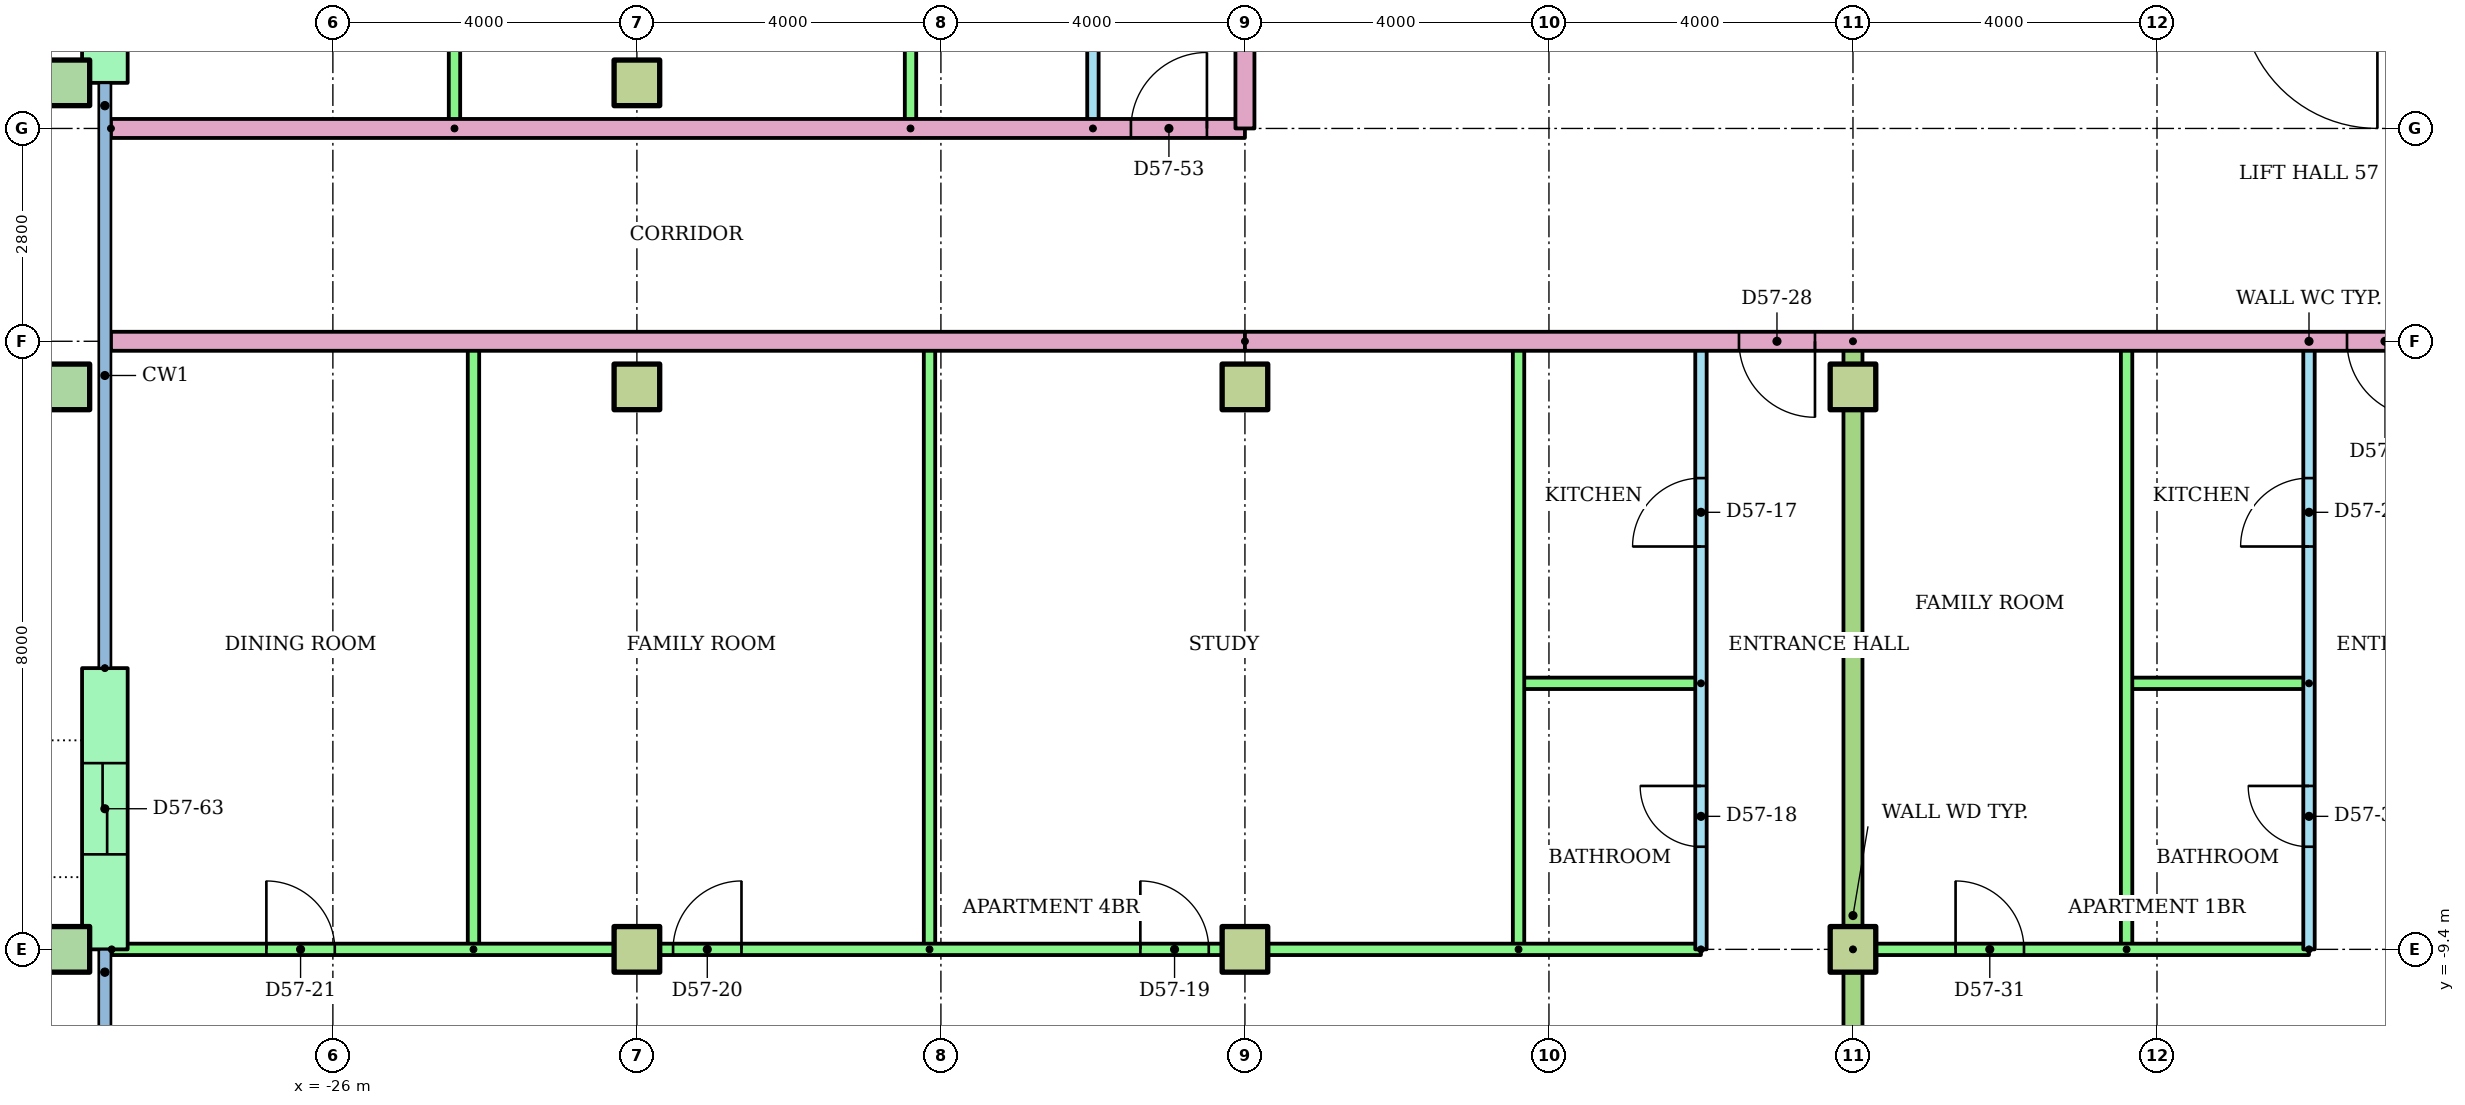
"""IFC4 building model, lengths in metres.
Left out: names, types, materials, properties, quantities, classifications, styles, units other than length and angle.
Written with IfcOpenShell. Run it as: python <this file> out.ifc"""

import sys

from ifc_helpers import new_model, si_unit, direction, frame, frame_2d, origin, origin_2d, place, context, subcontext, project, spatial, rectangle, hollow_rectangle, extrude, element, fill, save


model = new_model("IFC4")
c1 = context("Model", 3, precision=1e-05, world=origin(), true_north=direction((0.0, 1.0)))
c2 = subcontext(c1, "Body", "Model", "MODEL_VIEW")
j1 = project(units=[si_unit("LENGTHUNIT", "METRE"), si_unit("PLANEANGLEUNIT", "RADIAN")], contexts=[c1])
p1 = place(None, origin())
s1 = spatial("IfcSite", under=j1, at=p1, CompositionType="ELEMENT")
p2 = place(p1, origin())
s2 = spatial("IfcBuilding", under=s1, at=p2, CompositionType="ELEMENT")
p3 = place(p2, frame((0.0, 0.0, 220.4)))
s3 = spatial("IfcBuildingStorey", under=s2, at=p3, CompositionType="ELEMENT", Elevation=220.4)
p4 = place(p3, frame((-29.5, -9.4, 0.0)))
e1 = element("IfcColumn", 1, at=p4, inside=s3, PredefinedType="COLUMN", context=c2, shape_type="SweptSolid", body=[
    extrude(hollow_rectangle(XDim=0.6, YDim=0.6, WallThickness=0.03, at=origin_2d()), origin(), (0.0, 0.0, 1.0), 3.2),
])
for number, where in (
    (2, (-22.0, -9.4, 0.0)),
    (3, (-14.0, -9.4, 0.0)),
    (4, (-6.0, -9.4, 0.0)),
):
    element("IfcColumn", number, at=place(p3, frame(where)), inside=s3, PredefinedType="COLUMN", context=c2, shape_type="SweptSolid", body=[
        extrude(rectangle(XDim=0.6, YDim=0.6, at=origin_2d()), origin(), (0.0, 0.0, 1.0), 3.2),
    ])
p5 = place(p3, frame((-29.5, -2.0, 0.0)))
e5 = element("IfcColumn", 5, at=p5, inside=s3, PredefinedType="COLUMN", context=c2, shape_type="SweptSolid", body=[
    extrude(hollow_rectangle(XDim=0.6, YDim=0.6, WallThickness=0.03, at=origin_2d()), origin(), (0.0, 0.0, 1.0), 3.2),
])
for number, where in (
    (6, (-22.0, -2.0, 0.0)),
    (7, (-14.0, -2.0, 0.0)),
    (8, (-6.0, -2.0, 0.0)),
):
    element("IfcColumn", number, at=place(p3, frame(where)), inside=s3, PredefinedType="COLUMN", context=c2, shape_type="SweptSolid", body=[
        extrude(rectangle(XDim=0.6, YDim=0.6, at=origin_2d()), origin(), (0.0, 0.0, 1.0), 3.2),
    ])
p6 = place(p3, frame((-29.5, 2.0, 0.0)))
e9 = element("IfcColumn", 9, at=p6, inside=s3, PredefinedType="COLUMN", context=c2, shape_type="SweptSolid", body=[
    extrude(hollow_rectangle(XDim=0.6, YDim=0.6, WallThickness=0.03, at=origin_2d()), origin(), (0.0, 0.0, 1.0), 3.2),
])
p7 = place(p3, frame((-22.0, 2.0, 0.0)))
e10 = element("IfcColumn", 10, at=p7, inside=s3, PredefinedType="COLUMN", context=c2, shape_type="SweptSolid", body=[
    extrude(rectangle(XDim=0.6, YDim=0.6, at=origin_2d()), origin(), (0.0, 0.0, 1.0), 3.2),
])
p8 = place(p3, frame((-29.0, 6.5, 0.0), z_axis=(0.0, 0.0, 1.0), x_axis=(0.0, -1.0, 0.0)))
e11 = element("IfcWall", 11, at=p8, inside=s3, PredefinedType="STANDARD", context=c2, shape_type="SweptSolid", body=[
    extrude(rectangle(XDim=4.5, YDim=0.6, at=frame_2d((2.25, 0.0))), origin(), (0.0, 0.0, 1.0), 2.92),
])
p9 = place(p8, frame((1.65, 0.0, 0.0)))
e12 = element("IfcOpeningElement", 12, at=p9, cuts=e11, PredefinedType="OPENING", context=c2, shape_type="SweptSolid", body=[
    extrude(rectangle(XDim=1.2, YDim=2.1, at=frame_2d((0.6, 1.05))), frame((0.0, 0.31, 0.0), z_axis=(0.0, -1.0, 0.0), x_axis=(1.0, 0.0, 0.0)), (0.0, 0.0, 1.0), 0.62),
])
p10 = place(p3, frame((-29.0, -5.7, 0.0), z_axis=(0.0, 0.0, 1.0), x_axis=(0.0, -1.0, 0.0)))
e13 = element("IfcWall", 13, at=p10, inside=s3, PredefinedType="STANDARD", context=c2, shape_type="SweptSolid", body=[
    extrude(rectangle(XDim=3.7, YDim=0.6, at=frame_2d((1.85, 0.0))), origin(), (0.0, 0.0, 1.0), 2.92),
])
p11 = place(p10, frame((1.25, 0.0, 0.0)))
e14 = element("IfcOpeningElement", 14, at=p11, cuts=e13, PredefinedType="OPENING", context=c2, shape_type="SweptSolid", body=[
    extrude(rectangle(XDim=1.2, YDim=2.1, at=frame_2d((0.6, 1.05))), frame((0.0, 0.31, 0.0), z_axis=(0.0, -1.0, 0.0), x_axis=(1.0, 0.0, 0.0)), (0.0, 0.0, 1.0), 0.62),
])
p12 = place(p3, frame((-8.0, -9.4, 0.0), z_axis=(0.0, 0.0, 1.0), x_axis=(0.0, 1.0, 0.0)))
e15 = element("IfcWall", 15, at=p12, inside=s3, PredefinedType="PARTITIONING", context=c2, shape_type="SweptSolid", body=[
    extrude(rectangle(XDim=8.0, YDim=0.15, at=frame_2d((4.0, 0.0))), origin(), (0.0, 0.0, 1.0), 2.4),
])
p13 = place(p12, frame((5.3, 0.0, 0.0)))
e16 = element("IfcOpeningElement", 16, at=p13, cuts=e15, PredefinedType="OPENING", context=c2, shape_type="SweptSolid", body=[
    extrude(rectangle(XDim=0.9, YDim=2.1, at=frame_2d((0.45, 1.05))), frame((0.0, 0.085, 0.0), z_axis=(0.0, -1.0, 0.0), x_axis=(1.0, 0.0, 0.0)), (0.0, 0.0, 1.0), 0.17),
])
p14 = place(p12, frame((1.35, 0.0, 0.0)))
e17 = element("IfcOpeningElement", 17, at=p14, cuts=e15, PredefinedType="OPENING", context=c2, shape_type="SweptSolid", body=[
    extrude(rectangle(XDim=0.8, YDim=2.1, at=frame_2d((0.4, 1.05))), frame((0.0, 0.085, 0.0), z_axis=(0.0, -1.0, 0.0), x_axis=(1.0, 0.0, 0.0)), (0.0, 0.0, 1.0), 0.17),
])
p15 = place(p3, frame((-8.0, -5.9, 0.0), z_axis=(0.0, 0.0, 1.0), x_axis=(-1.0, 0.0, 0.0)))
e18 = element("IfcWall", 18, at=p15, inside=s3, PredefinedType="PARTITIONING", context=c2, shape_type="SweptSolid", body=[
    extrude(rectangle(XDim=2.4, YDim=0.15, at=frame_2d((1.2, 0.0))), origin(), (0.0, 0.0, 1.0), 2.4),
])
for number, where, z_axis, x_axis in (
    (19, (-10.4, -9.4, 0.0), (0.0, 0.0, 1.0), (0.0, 1.0, 0.0)),
    (20, (-18.15, -9.4, 0.0), (0.0, 0.0, 1.0), (0.0, 1.0, 0.0)),
    (21, (-24.15, -9.4, 0.0), (0.0, 0.0, 1.0), (0.0, 1.0, 0.0)),
):
    element("IfcWall", number, at=place(p3, frame(where, z_axis=z_axis, x_axis=x_axis)), inside=s3, PredefinedType="PARTITIONING", context=c2, shape_type="SweptSolid", body=[
        extrude(rectangle(XDim=8.0, YDim=0.15, at=frame_2d((4.0, 0.0))), origin(), (0.0, 0.0, 1.0), 2.4),
    ])
p16 = place(p3, frame((-28.91, -9.4, 0.0)))
e22 = element("IfcWall", 22, at=p16, inside=s3, PredefinedType="PARTITIONING", context=c2, shape_type="SweptSolid", body=[
    extrude(rectangle(XDim=20.91, YDim=0.15, at=frame_2d((10.455, 0.0))), origin(), (0.0, 0.0, 1.0), 2.4),
])
p17 = place(p16, frame((13.534, 0.0, 0.0)))
e23 = element("IfcOpeningElement", 23, at=p17, cuts=e22, PredefinedType="OPENING", context=c2, shape_type="SweptSolid", body=[
    extrude(rectangle(XDim=0.9, YDim=2.1, at=frame_2d((0.45, 1.05))), frame((0.0, 0.085, 0.0), z_axis=(0.0, -1.0, 0.0), x_axis=(1.0, 0.0, 0.0)), (0.0, 0.0, 1.0), 0.17),
])
p18 = place(p16, frame((7.386, 0.0, 0.0)))
e24 = element("IfcOpeningElement", 24, at=p18, cuts=e22, PredefinedType="OPENING", context=c2, shape_type="SweptSolid", body=[
    extrude(rectangle(XDim=0.9, YDim=2.1, at=frame_2d((0.45, 1.05))), frame((0.0, 0.085, 0.0), z_axis=(0.0, -1.0, 0.0), x_axis=(1.0, 0.0, 0.0)), (0.0, 0.0, 1.0), 0.17),
])
p19 = place(p16, frame((2.035, 0.0, 0.0)))
e25 = element("IfcOpeningElement", 25, at=p19, cuts=e22, PredefinedType="OPENING", context=c2, shape_type="SweptSolid", body=[
    extrude(rectangle(XDim=0.9, YDim=2.1, at=frame_2d((0.45, 1.05))), frame((0.0, 0.085, 0.0), z_axis=(0.0, -1.0, 0.0), x_axis=(1.0, 0.0, 0.0)), (0.0, 0.0, 1.0), 0.17),
])
p20 = place(p3, frame((0.0, -9.4, 0.0), z_axis=(0.0, 0.0, 1.0), x_axis=(0.0, 1.0, 0.0)))
e26 = element("IfcWall", 26, at=p20, inside=s3, PredefinedType="PARTITIONING", context=c2, shape_type="SweptSolid", body=[
    extrude(rectangle(XDim=8.0, YDim=0.15, at=frame_2d((4.0, 0.0))), origin(), (0.0, 0.0, 1.0), 2.4),
])
p21 = place(p20, frame((5.3, 0.0, 0.0)))
e27 = element("IfcOpeningElement", 27, at=p21, cuts=e26, PredefinedType="OPENING", context=c2, shape_type="SweptSolid", body=[
    extrude(rectangle(XDim=0.9, YDim=2.1, at=frame_2d((0.45, 1.05))), frame((0.0, 0.085, 0.0), z_axis=(0.0, -1.0, 0.0), x_axis=(1.0, 0.0, 0.0)), (0.0, 0.0, 1.0), 0.17),
])
p22 = place(p20, frame((1.35, 0.0, 0.0)))
e28 = element("IfcOpeningElement", 28, at=p22, cuts=e26, PredefinedType="OPENING", context=c2, shape_type="SweptSolid", body=[
    extrude(rectangle(XDim=0.8, YDim=2.1, at=frame_2d((0.4, 1.05))), frame((0.0, 0.085, 0.0), z_axis=(0.0, -1.0, 0.0), x_axis=(1.0, 0.0, 0.0)), (0.0, 0.0, 1.0), 0.17),
])
p23 = place(p3, frame((0.0, -5.9, 0.0), z_axis=(0.0, 0.0, 1.0), x_axis=(-1.0, 0.0, 0.0)))
e29 = element("IfcWall", 29, at=p23, inside=s3, PredefinedType="PARTITIONING", context=c2, shape_type="SweptSolid", body=[
    extrude(rectangle(XDim=2.4, YDim=0.15, at=frame_2d((1.2, 0.0))), origin(), (0.0, 0.0, 1.0), 2.4),
])
p24 = place(p3, frame((-2.4, -9.4, 0.0), z_axis=(0.0, 0.0, 1.0), x_axis=(0.0, 1.0, 0.0)))
e30 = element("IfcWall", 30, at=p24, inside=s3, PredefinedType="PARTITIONING", context=c2, shape_type="SweptSolid", body=[
    extrude(rectangle(XDim=8.0, YDim=0.15, at=frame_2d((4.0, 0.0))), origin(), (0.0, 0.0, 1.0), 2.4),
])
p25 = place(p3, frame((-6.0, -9.4, 0.0)))
e31 = element("IfcWall", 31, at=p25, inside=s3, PredefinedType="PARTITIONING", context=c2, shape_type="SweptSolid", body=[
    extrude(rectangle(XDim=6.0, YDim=0.15, at=frame_2d((3.0, 0.0))), origin(), (0.0, 0.0, 1.0), 2.4),
])
p26 = place(p25, frame((1.35, 0.0, 0.0)))
e32 = element("IfcOpeningElement", 32, at=p26, cuts=e31, PredefinedType="OPENING", context=c2, shape_type="SweptSolid", body=[
    extrude(rectangle(XDim=0.9, YDim=2.1, at=frame_2d((0.45, 1.05))), frame((0.0, 0.085, 0.0), z_axis=(0.0, -1.0, 0.0), x_axis=(1.0, 0.0, 0.0)), (0.0, 0.0, 1.0), 0.17),
])
p27 = place(p3, frame((-6.0, -1.4, 0.0), z_axis=(0.0, 0.0, 1.0), x_axis=(0.0, -1.0, 0.0)))
e33 = element("IfcWall", 33, at=p27, inside=s3, PredefinedType="PARTITIONING", context=c2, shape_type="SweptSolid", body=[
    extrude(rectangle(XDim=15.11, YDim=0.25, at=frame_2d((7.555, 0.0))), origin(), (0.0, 0.0, 1.0), 2.4),
])
p28 = place(p3, frame((-14.0, -1.4, 0.0), z_axis=(0.0, 0.0, 1.0), x_axis=(-1.0, 0.0, 0.0)))
e34 = element("IfcWall", 34, at=p28, inside=s3, PredefinedType="PARTITIONING", context=c2, shape_type="SweptSolid", body=[
    extrude(rectangle(XDim=14.92, YDim=0.25, at=frame_2d((7.46, 0.0))), origin(), (0.0, 0.0, 1.0), 2.4),
])
p29 = place(p3, frame((-16.0, 1.4, 0.0), z_axis=(0.0, 0.0, 1.0), x_axis=(0.0, 1.0, 0.0)))
e35 = element("IfcWall", 35, at=p29, inside=s3, PredefinedType="PARTITIONING", context=c2, shape_type="SweptSolid", body=[
    extrude(rectangle(XDim=10.4, YDim=0.15, at=frame_2d((5.2, 0.0))), origin(), (0.0, 0.0, 1.0), 2.4),
])
p30 = place(p29, frame((2.425, 0.0, 0.0)))
e36 = element("IfcOpeningElement", 36, at=p30, cuts=e35, PredefinedType="OPENING", context=c2, shape_type="SweptSolid", body=[
    extrude(rectangle(XDim=0.9, YDim=2.1, at=frame_2d((0.45, 1.05))), frame((0.0, 0.085, 0.0), z_axis=(0.0, -1.0, 0.0), x_axis=(1.0, 0.0, 0.0)), (0.0, 0.0, 1.0), 0.17),
])
p31 = place(p29, frame((7.675, 0.0, 0.0)))
e37 = element("IfcOpeningElement", 37, at=p31, cuts=e35, PredefinedType="OPENING", context=c2, shape_type="SweptSolid", body=[
    extrude(rectangle(XDim=0.8, YDim=2.1, at=frame_2d((0.4, 1.05))), frame((0.0, 0.085, 0.0), z_axis=(0.0, -1.0, 0.0), x_axis=(1.0, 0.0, 0.0)), (0.0, 0.0, 1.0), 0.17),
])
for number, where, z_axis, x_axis in (
    (38, (-18.4, 1.4, 0.0), (0.0, 0.0, 1.0), (0.0, 1.0, 0.0)),
    (39, (-24.4, 1.4, 0.0), (0.0, 0.0, 1.0), (0.0, 1.0, 0.0)),
):
    element("IfcWall", number, at=place(p3, frame(where, z_axis=z_axis, x_axis=x_axis)), inside=s3, PredefinedType="PARTITIONING", context=c2, shape_type="SweptSolid", body=[
        extrude(rectangle(XDim=10.4, YDim=0.15, at=frame_2d((5.2, 0.0))), origin(), (0.0, 0.0, 1.0), 2.4),
    ])
p32 = place(p3, frame((-28.92, 1.4, 0.0)))
e40 = element("IfcWall", 40, at=p32, inside=s3, PredefinedType="PARTITIONING", context=c2, shape_type="SweptSolid", body=[
    extrude(rectangle(XDim=14.92, YDim=0.25, at=frame_2d((7.46, 0.0))), origin(), (0.0, 0.0, 1.0), 2.4),
])
p33 = place(p32, frame((13.42, 0.0, 0.0)))
e41 = element("IfcOpeningElement", 41, at=p33, cuts=e40, PredefinedType="OPENING", context=c2, shape_type="SweptSolid", body=[
    extrude(rectangle(XDim=1.0, YDim=2.1, at=frame_2d((0.5, 1.05))), frame((0.0, 0.135, 0.0), z_axis=(0.0, -1.0, 0.0), x_axis=(1.0, 0.0, 0.0)), (0.0, 0.0, 1.0), 0.27),
])
p34 = place(p3, frame((14.0, -1.4, 0.0), z_axis=(0.0, 0.0, 1.0), x_axis=(-1.0, 0.0, 0.0)))
e42 = element("IfcWall", 42, at=p34, inside=s3, PredefinedType="PARTITIONING", context=c2, shape_type="SweptSolid", body=[
    extrude(rectangle(XDim=28.0, YDim=0.25, at=frame_2d((14.0, 0.0))), origin(), (0.0, 0.0, 1.0), 2.4),
])
p35 = place(p34, frame((20.5, 0.0, 0.0)))
e43 = element("IfcOpeningElement", 43, at=p35, cuts=e42, PredefinedType="OPENING", context=c2, shape_type="SweptSolid", body=[
    extrude(rectangle(XDim=1.0, YDim=2.1, at=frame_2d((0.5, 1.05))), frame((0.0, 0.135, 0.0), z_axis=(0.0, -1.0, 0.0), x_axis=(1.0, 0.0, 0.0)), (0.0, 0.0, 1.0), 0.27),
])
p36 = place(p34, frame((12.5, 0.0, 0.0)))
e44 = element("IfcOpeningElement", 44, at=p36, cuts=e42, PredefinedType="OPENING", context=c2, shape_type="SweptSolid", body=[
    extrude(rectangle(XDim=1.0, YDim=2.1, at=frame_2d((0.5, 1.05))), frame((0.0, 0.135, 0.0), z_axis=(0.0, -1.0, 0.0), x_axis=(1.0, 0.0, 0.0)), (0.0, 0.0, 1.0), 0.27),
])
p37 = place(p34, frame((10.5, 0.0, 0.0)))
e45 = element("IfcOpeningElement", 45, at=p37, cuts=e42, PredefinedType="OPENING", context=c2, shape_type="SweptSolid", body=[
    extrude(rectangle(XDim=1.0, YDim=2.1, at=frame_2d((0.5, 1.05))), frame((0.0, 0.135, 0.0), z_axis=(0.0, -1.0, 0.0), x_axis=(1.0, 0.0, 0.0)), (0.0, 0.0, 1.0), 0.27),
])
p38 = place(p3, frame((-14.0, 3.0, 0.0), z_axis=(0.0, 0.0, 1.0), x_axis=(0.0, -1.0, 0.0)))
e46 = element("IfcWall", 46, at=p38, inside=s3, PredefinedType="PARTITIONING", context=c2, shape_type="SweptSolid", body=[
    extrude(rectangle(XDim=1.6, YDim=0.25, at=frame_2d((0.8, 0.0))), origin(), (0.0, 0.0, 1.0), 2.4),
])
p39 = place(p13, origin())
e47 = element("IfcDoor", 47, at=p39, inside=s3, OperationType="SINGLE_SWING_LEFT", PredefinedType="DOOR", context=c2, shape_type="SweptSolid", body=[
    extrude(rectangle(XDim=0.9, YDim=2.1, at=frame_2d((0.45, 1.05))), frame((0.0, 0.025, 0.0), z_axis=(0.0, -1.0, 0.0), x_axis=(1.0, 0.0, 0.0)), (0.0, 0.0, 1.0), 0.05),
])
fill(e16, e47)
p40 = place(p14, origin())
e48 = element("IfcDoor", 48, at=p40, inside=s3, OperationType="SINGLE_SWING_RIGHT", PredefinedType="DOOR", context=c2, shape_type="SweptSolid", body=[
    extrude(rectangle(XDim=0.8, YDim=2.1, at=frame_2d((0.4, 1.05))), frame((0.0, 0.025, 0.0), z_axis=(0.0, -1.0, 0.0), x_axis=(1.0, 0.0, 0.0)), (0.0, 0.0, 1.0), 0.05),
])
fill(e17, e48)
p41 = place(p17, origin())
e49 = element("IfcDoor", 49, at=p41, inside=s3, OperationType="SINGLE_SWING_LEFT", PredefinedType="DOOR", context=c2, shape_type="SweptSolid", body=[
    extrude(rectangle(XDim=0.9, YDim=2.1, at=frame_2d((0.45, 1.05))), frame((0.0, 0.025, 0.0), z_axis=(0.0, -1.0, 0.0), x_axis=(1.0, 0.0, 0.0)), (0.0, 0.0, 1.0), 0.05),
])
fill(e23, e49)
p42 = place(p18, origin())
e50 = element("IfcDoor", 50, at=p42, inside=s3, OperationType="SINGLE_SWING_RIGHT", PredefinedType="DOOR", context=c2, shape_type="SweptSolid", body=[
    extrude(rectangle(XDim=0.9, YDim=2.1, at=frame_2d((0.45, 1.05))), frame((0.0, 0.025, 0.0), z_axis=(0.0, -1.0, 0.0), x_axis=(1.0, 0.0, 0.0)), (0.0, 0.0, 1.0), 0.05),
])
fill(e24, e50)
p43 = place(p19, origin())
e51 = element("IfcDoor", 51, at=p43, inside=s3, OperationType="SINGLE_SWING_LEFT", PredefinedType="DOOR", context=c2, shape_type="SweptSolid", body=[
    extrude(rectangle(XDim=0.9, YDim=2.1, at=frame_2d((0.45, 1.05))), frame((0.0, 0.025, 0.0), z_axis=(0.0, -1.0, 0.0), x_axis=(1.0, 0.0, 0.0)), (0.0, 0.0, 1.0), 0.05),
])
fill(e25, e51)
p44 = place(p35, origin())
e52 = element("IfcDoor", 52, at=p44, inside=s3, OperationType="SINGLE_SWING_LEFT", PredefinedType="DOOR", context=c2, shape_type="SweptSolid", body=[
    extrude(rectangle(XDim=1.0, YDim=2.1, at=frame_2d((0.5, 1.05))), frame((0.0, 0.025, 0.0), z_axis=(0.0, -1.0, 0.0), x_axis=(1.0, 0.0, 0.0)), (0.0, 0.0, 1.0), 0.05),
])
fill(e43, e52)
p45 = place(p21, origin())
e53 = element("IfcDoor", 53, at=p45, inside=s3, OperationType="SINGLE_SWING_LEFT", PredefinedType="DOOR", context=c2, shape_type="SweptSolid", body=[
    extrude(rectangle(XDim=0.9, YDim=2.1, at=frame_2d((0.45, 1.05))), frame((0.0, 0.025, 0.0), z_axis=(0.0, -1.0, 0.0), x_axis=(1.0, 0.0, 0.0)), (0.0, 0.0, 1.0), 0.05),
])
fill(e27, e53)
p46 = place(p22, origin())
e54 = element("IfcDoor", 54, at=p46, inside=s3, OperationType="SINGLE_SWING_RIGHT", PredefinedType="DOOR", context=c2, shape_type="SweptSolid", body=[
    extrude(rectangle(XDim=0.8, YDim=2.1, at=frame_2d((0.4, 1.05))), frame((0.0, 0.025, 0.0), z_axis=(0.0, -1.0, 0.0), x_axis=(1.0, 0.0, 0.0)), (0.0, 0.0, 1.0), 0.05),
])
fill(e28, e54)
p47 = place(p26, origin())
e55 = element("IfcDoor", 55, at=p47, inside=s3, OperationType="SINGLE_SWING_LEFT", PredefinedType="DOOR", context=c2, shape_type="SweptSolid", body=[
    extrude(rectangle(XDim=0.9, YDim=2.1, at=frame_2d((0.45, 1.05))), frame((0.0, 0.025, 0.0), z_axis=(0.0, -1.0, 0.0), x_axis=(1.0, 0.0, 0.0)), (0.0, 0.0, 1.0), 0.05),
])
fill(e32, e55)
p48 = place(p36, origin())
e56 = element("IfcDoor", 56, at=p48, inside=s3, OperationType="SINGLE_SWING_LEFT", PredefinedType="DOOR", context=c2, shape_type="SweptSolid", body=[
    extrude(rectangle(XDim=1.0, YDim=2.1, at=frame_2d((0.5, 1.05))), frame((0.0, 0.025, 0.0), z_axis=(0.0, -1.0, 0.0), x_axis=(1.0, 0.0, 0.0)), (0.0, 0.0, 1.0), 0.05),
])
fill(e44, e56)
p49 = place(p33, origin())
e57 = element("IfcDoor", 57, at=p49, inside=s3, OperationType="SINGLE_SWING_RIGHT", PredefinedType="DOOR", context=c2, shape_type="SweptSolid", body=[
    extrude(rectangle(XDim=1.0, YDim=2.1, at=frame_2d((0.5, 1.05))), frame((0.0, 0.025, 0.0), z_axis=(0.0, -1.0, 0.0), x_axis=(1.0, 0.0, 0.0)), (0.0, 0.0, 1.0), 0.05),
])
fill(e41, e57)
p50 = place(p11, origin())
e58 = element("IfcDoor", 58, at=p50, inside=s3, OperationType="SLIDING_TO_LEFT", PredefinedType="DOOR", context=c2, shape_type="SweptSolid", body=[
    extrude(rectangle(XDim=1.2, YDim=2.1, at=frame_2d((0.6, 1.05))), frame((0.0, 0.025, 0.0), z_axis=(0.0, -1.0, 0.0), x_axis=(1.0, 0.0, 0.0)), (0.0, 0.0, 1.0), 0.05),
])
fill(e14, e58)
save(model, sys.argv[1])
